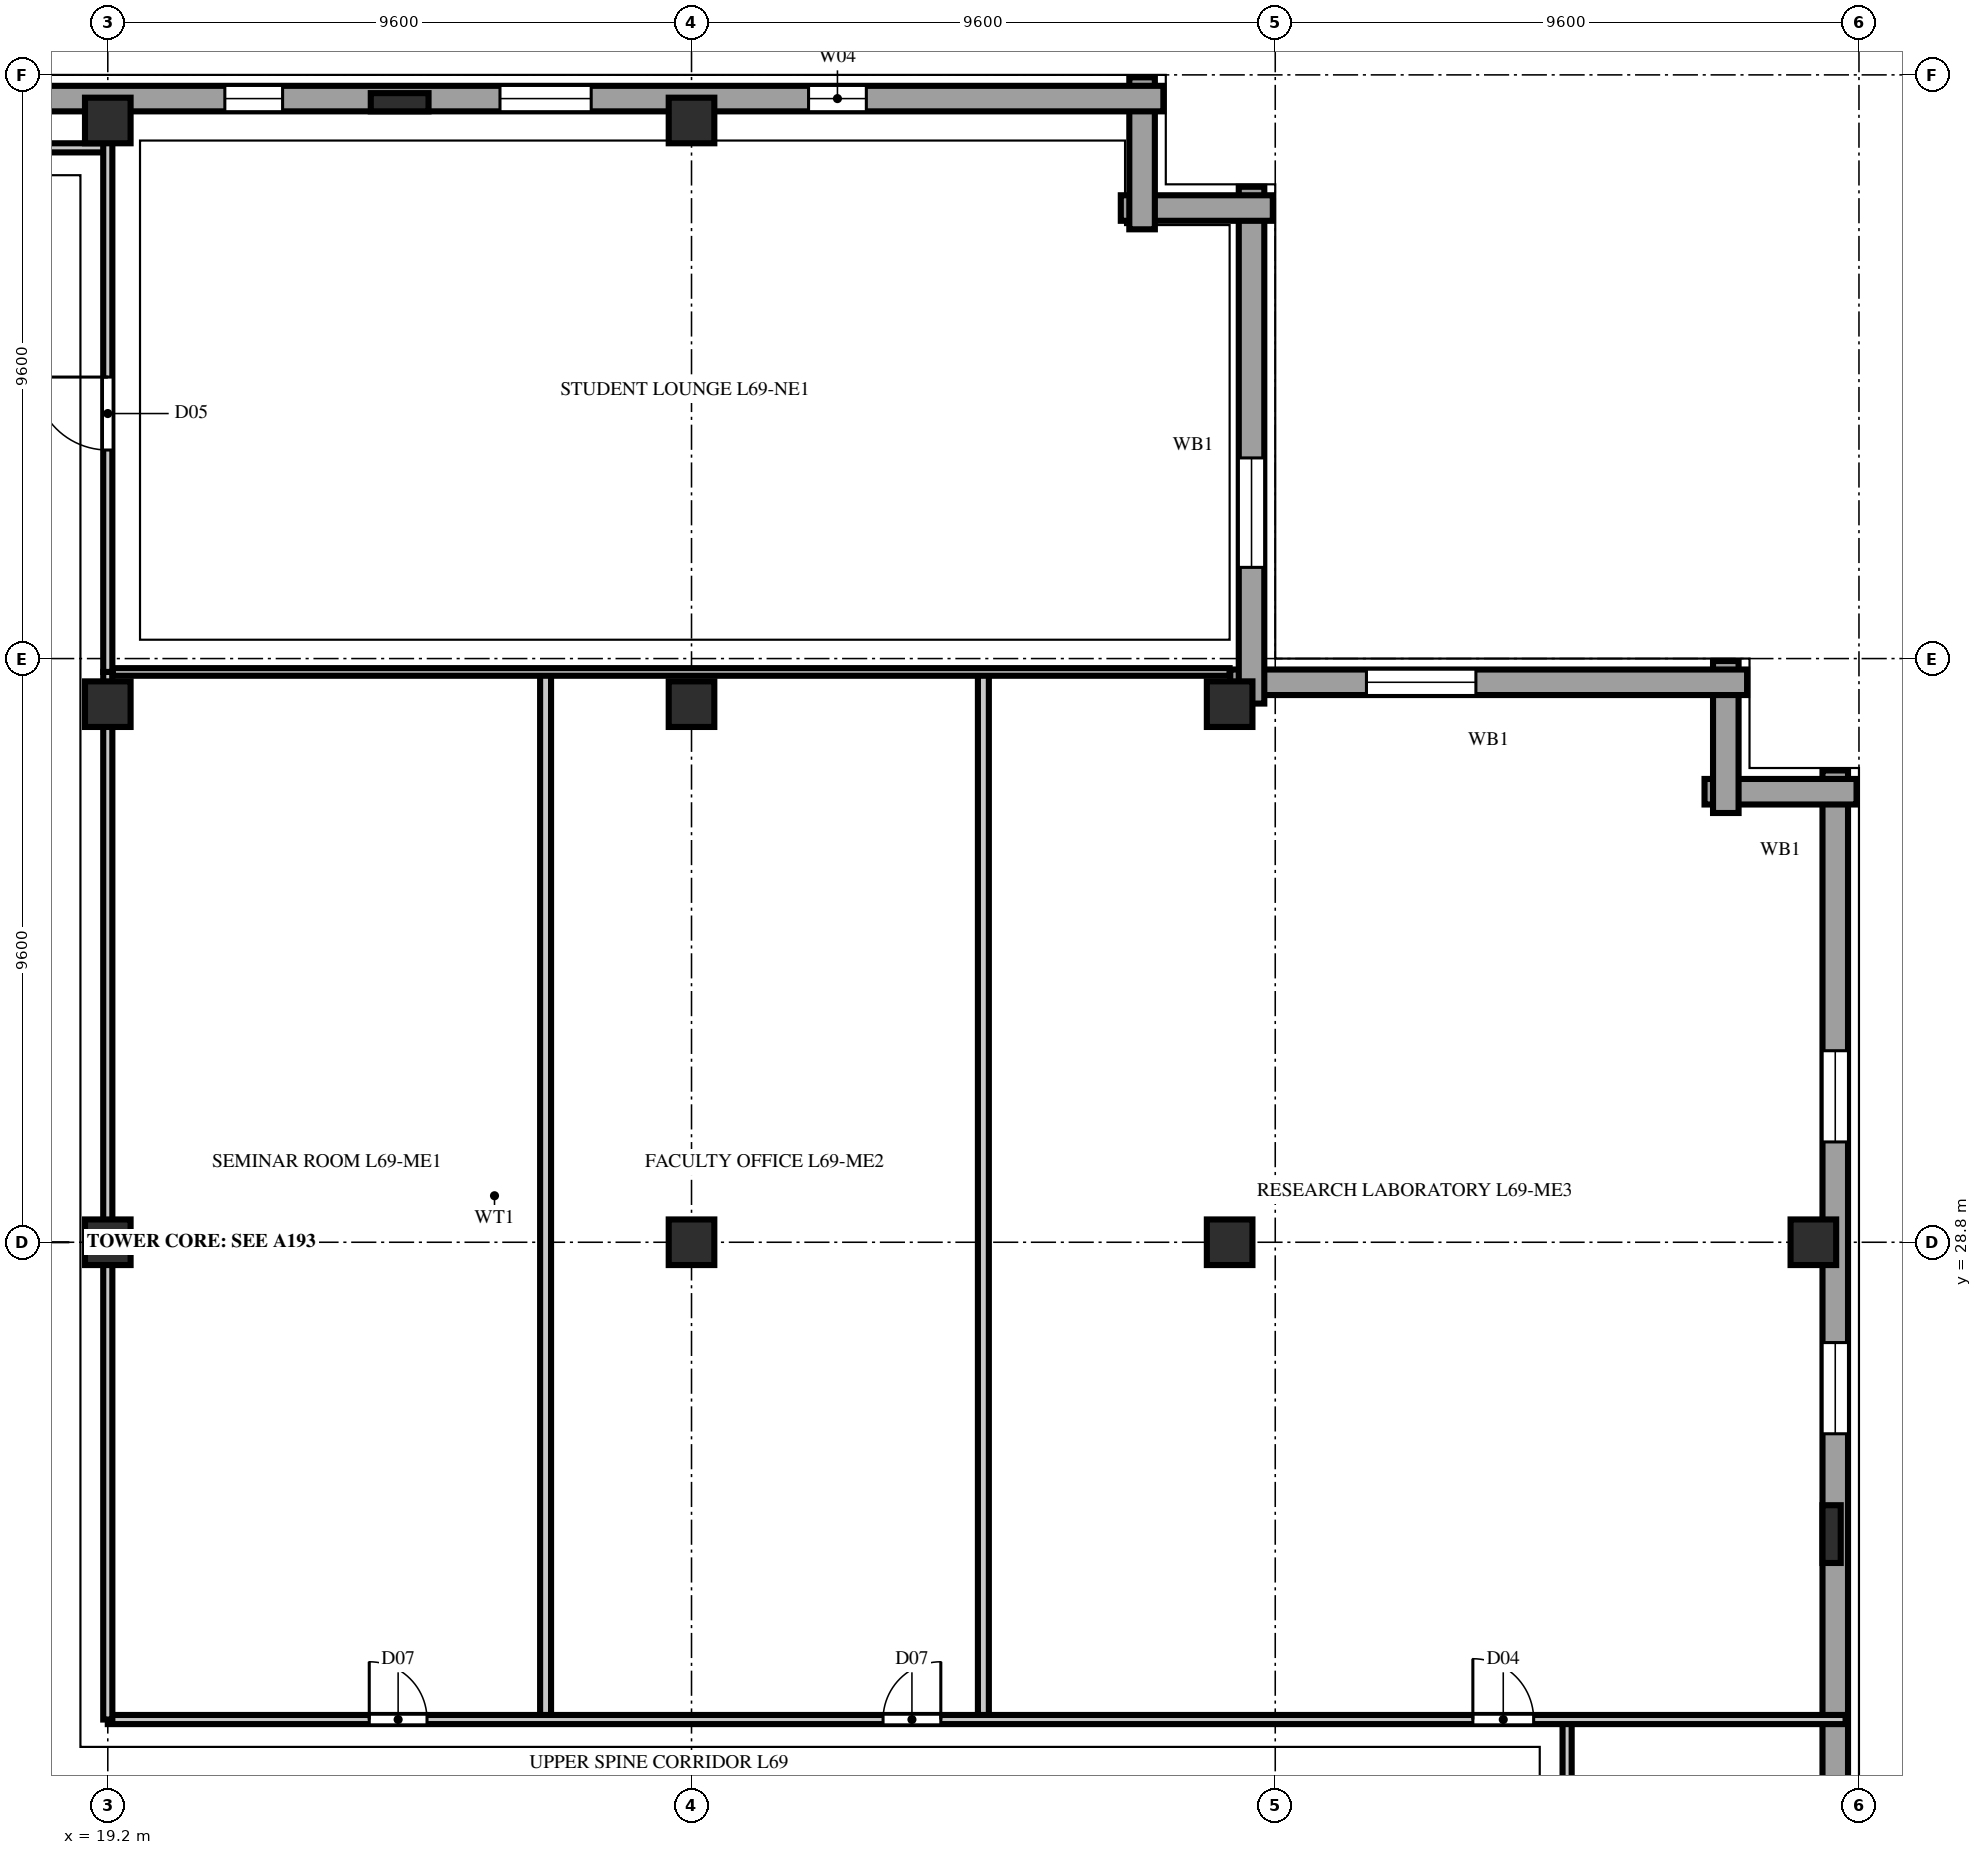
"""IFC4 building model, lengths in metres.
Left out: names, types, materials, properties, quantities, classifications, styles, units other than length and angle.
Written with IfcOpenShell. Run it as: python <this file> out.ifc"""

import sys

from ifc_helpers import new_model, si_unit, direction, frame, frame_2d, origin, origin_2d, place, context, subcontext, project, spatial, rectangle, extrude, element, fill, save


model = new_model("IFC4")
c1 = context("Model", 3, precision=1e-05, world=origin(), true_north=direction((0.0, 1.0)))
c2 = subcontext(c1, "Body", "Model", "MODEL_VIEW")
j1 = project(units=[si_unit("LENGTHUNIT", "METRE"), si_unit("PLANEANGLEUNIT", "RADIAN")], contexts=[c1])
p1 = place(None, origin())
s1 = spatial("IfcSite", under=j1, at=p1, CompositionType="ELEMENT")
p2 = place(p1, origin())
s2 = spatial("IfcBuilding", under=s1, at=p2, CompositionType="ELEMENT")
p3 = place(p2, frame((0.0, 0.0, 273.4)))
s3 = spatial("IfcBuildingStorey", under=s2, at=p3, CompositionType="ELEMENT", Elevation=273.4)
for number, where, z_axis, x_axis in (
    (1, (19.2, 28.8, 0.0), (0.0, 0.0, 1.0), (1.0, 0.0, 0.0)),
    (2, (19.2, 37.65, 0.0), (0.0, 0.0, 1.0), (1.0, 0.0, 0.0)),
    (3, (19.2, 47.25, 0.0), (0.0, 0.0, 1.0), (1.0, 0.0, 0.0)),
    (4, (28.8, 28.8, 0.0), (0.0, 0.0, 1.0), (1.0, 0.0, 0.0)),
    (5, (28.8, 37.65, 0.0), (0.0, 0.0, 1.0), (1.0, 0.0, 0.0)),
    (6, (28.8, 47.25, 0.0), (0.0, 0.0, 1.0), (1.0, 0.0, 0.0)),
    (7, (37.65, 28.8, 0.0), (0.0, 0.0, 1.0), (1.0, 0.0, 0.0)),
    (8, (37.65, 37.65, 0.0), (0.0, 0.0, 1.0), (1.0, 0.0, 0.0)),
    (9, (47.25, 28.8, 0.0), (0.0, 0.0, 1.0), (1.0, 0.0, 0.0)),
):
    element("IfcColumn", number, at=place(p3, frame(where, z_axis=z_axis, x_axis=x_axis)), inside=s3, PredefinedType="COLUMN", context=c2, shape_type="SweptSolid", body=[
        extrude(rectangle(XDim=0.75, YDim=0.75, at=origin_2d()), origin(), (0.0, 0.0, 1.0), 3.8),
    ])
for number, where, z_axis, x_axis in (
    (10, (47.55, 24.0, 0.0), (0.0, 0.0, 1.0), (0.0, 1.0, 0.0)),
    (11, (24.0, 47.55, 0.0), (0.0, 0.0, 1.0), (1.0, 0.0, 0.0)),
):
    element("IfcColumn", number, at=place(p3, frame(where, z_axis=z_axis, x_axis=x_axis)), inside=s3, PredefinedType="PILASTER", context=c2, shape_type="SweptSolid", body=[
        extrude(rectangle(XDim=0.95, YDim=0.3, at=origin_2d()), origin(), (0.0, 0.0, 1.0), 3.8),
    ])
p4 = place(p3, frame((47.61, 1.84, 0.0), z_axis=(0.0, 0.0, 1.0), x_axis=(0.0, 1.0, 0.0)))
e12 = element("IfcWall", 12, at=p4, inside=s3, PredefinedType="SOLIDWALL", context=c2, shape_type="SweptSolid", body=[
    extrude(rectangle(XDim=34.72, YDim=0.42, at=frame_2d((17.36, 0.0))), origin(), (0.0, 0.0, 1.0), 3.54),
])
p5 = place(p4, frame((4.61, 0.0, 0.85)))
e13 = element("IfcOpeningElement", 13, at=p5, cuts=e12, PredefinedType="OPENING", context=c2, shape_type="SweptSolid", body=[
    extrude(rectangle(XDim=1.5, YDim=1.85, at=frame_2d((0.75, 0.925))), frame((0.0, 0.222, 0.0), z_axis=(0.0, -1.0, 0.0), x_axis=(1.0, 0.0, 0.0)), (0.0, 0.0, 1.0), 0.444),
])
p6 = place(p4, frame((9.41, 0.0, 0.85)))
e14 = element("IfcOpeningElement", 14, at=p6, cuts=e12, PredefinedType="OPENING", context=c2, shape_type="SweptSolid", body=[
    extrude(rectangle(XDim=1.5, YDim=1.85, at=frame_2d((0.75, 0.925))), frame((0.0, 0.222, 0.0), z_axis=(0.0, -1.0, 0.0), x_axis=(1.0, 0.0, 0.0)), (0.0, 0.0, 1.0), 0.444),
])
p7 = place(p4, frame((14.21, 0.0, 0.85)))
e15 = element("IfcOpeningElement", 15, at=p7, cuts=e12, PredefinedType="OPENING", context=c2, shape_type="SweptSolid", body=[
    extrude(rectangle(XDim=1.5, YDim=1.85, at=frame_2d((0.75, 0.925))), frame((0.0, 0.222, 0.0), z_axis=(0.0, -1.0, 0.0), x_axis=(1.0, 0.0, 0.0)), (0.0, 0.0, 1.0), 0.444),
])
p8 = place(p4, frame((23.81, 0.0, 0.85)))
e16 = element("IfcOpeningElement", 16, at=p8, cuts=e12, PredefinedType="OPENING", context=c2, shape_type="SweptSolid", body=[
    extrude(rectangle(XDim=1.5, YDim=1.85, at=frame_2d((0.75, 0.925))), frame((0.0, 0.222, 0.0), z_axis=(0.0, -1.0, 0.0), x_axis=(1.0, 0.0, 0.0)), (0.0, 0.0, 1.0), 0.444),
])
p9 = place(p4, frame((28.61, 0.0, 0.85)))
e17 = element("IfcOpeningElement", 17, at=p9, cuts=e12, PredefinedType="OPENING", context=c2, shape_type="SweptSolid", body=[
    extrude(rectangle(XDim=1.5, YDim=1.85, at=frame_2d((0.75, 0.925))), frame((0.0, 0.222, 0.0), z_axis=(0.0, -1.0, 0.0), x_axis=(1.0, 0.0, 0.0)), (0.0, 0.0, 1.0), 0.444),
])
for number, where, z_axis, x_axis in (
    (18, (47.96, 36.21, 0.0), (0.0, 0.0, 1.0), (-1.0, 0.0, 0.0)),
    (19, (45.81, 35.86, 0.0), (0.0, 0.0, 1.0), (0.0, 1.0, 0.0)),
):
    element("IfcWall", number, at=place(p3, frame(where, z_axis=z_axis, x_axis=x_axis)), inside=s3, PredefinedType="SOLIDWALL", context=c2, shape_type="SweptSolid", body=[
        extrude(rectangle(XDim=2.5, YDim=0.42, at=frame_2d((1.25, 0.0))), origin(), (0.0, 0.0, 1.0), 3.54),
    ])
p10 = place(p3, frame((46.16, 38.01, 0.0), z_axis=(0.0, 0.0, 1.0), x_axis=(-1.0, 0.0, 0.0)))
e20 = element("IfcWall", 20, at=p10, inside=s3, PredefinedType="SOLIDWALL", context=c2, shape_type="SweptSolid", body=[
    extrude(rectangle(XDim=8.5, YDim=0.42, at=frame_2d((4.25, 0.0))), origin(), (0.0, 0.0, 1.0), 3.54),
])
p11 = place(p10, frame((4.46, 0.0, 0.85)))
e21 = element("IfcOpeningElement", 21, at=p11, cuts=e20, PredefinedType="OPENING", context=c2, shape_type="SweptSolid", body=[
    extrude(rectangle(XDim=1.8, YDim=1.85, at=frame_2d((0.9, 0.925))), frame((0.0, 0.222, 0.0), z_axis=(0.0, -1.0, 0.0), x_axis=(1.0, 0.0, 0.0)), (0.0, 0.0, 1.0), 0.444),
])
p12 = place(p3, frame((38.01, 37.66, 0.0), z_axis=(0.0, 0.0, 1.0), x_axis=(0.0, 1.0, 0.0)))
e22 = element("IfcWall", 22, at=p12, inside=s3, PredefinedType="SOLIDWALL", context=c2, shape_type="SweptSolid", body=[
    extrude(rectangle(XDim=8.5, YDim=0.42, at=frame_2d((4.25, 0.0))), origin(), (0.0, 0.0, 1.0), 3.54),
])
p13 = place(p12, frame((2.24, 0.0, 0.85)))
e23 = element("IfcOpeningElement", 23, at=p13, cuts=e22, PredefinedType="OPENING", context=c2, shape_type="SweptSolid", body=[
    extrude(rectangle(XDim=1.8, YDim=1.85, at=frame_2d((0.9, 0.925))), frame((0.0, 0.222, 0.0), z_axis=(0.0, -1.0, 0.0), x_axis=(1.0, 0.0, 0.0)), (0.0, 0.0, 1.0), 0.444),
])
for number, where, z_axis, x_axis in (
    (24, (38.36, 45.81, 0.0), (0.0, 0.0, 1.0), (-1.0, 0.0, 0.0)),
    (25, (36.21, 45.46, 0.0), (0.0, 0.0, 1.0), (0.0, 1.0, 0.0)),
):
    element("IfcWall", number, at=place(p3, frame(where, z_axis=z_axis, x_axis=x_axis)), inside=s3, PredefinedType="SOLIDWALL", context=c2, shape_type="SweptSolid", body=[
        extrude(rectangle(XDim=2.5, YDim=0.42, at=frame_2d((1.25, 0.0))), origin(), (0.0, 0.0, 1.0), 3.54),
    ])
p14 = place(p3, frame((36.56, 47.61, 0.0), z_axis=(0.0, 0.0, 1.0), x_axis=(-1.0, 0.0, 0.0)))
e26 = element("IfcWall", 26, at=p14, inside=s3, PredefinedType="SOLIDWALL", context=c2, shape_type="SweptSolid", body=[
    extrude(rectangle(XDim=34.085, YDim=0.42, at=frame_2d((17.042, 0.0))), origin(), (0.0, 0.0, 1.0), 3.54),
])
p15 = place(p14, frame((4.885, 0.0, 0.9)))
e27 = element("IfcOpeningElement", 27, at=p15, cuts=e26, PredefinedType="OPENING", context=c2, shape_type="SweptSolid", body=[
    extrude(rectangle(XDim=0.95, YDim=1.85, at=frame_2d((0.475, 0.925))), frame((0.0, 0.222, 0.0), z_axis=(0.0, -1.0, 0.0), x_axis=(1.0, 0.0, 0.0)), (0.0, 0.0, 1.0), 0.444),
])
p16 = place(p14, frame((9.41, 0.0, 0.9)))
e28 = element("IfcOpeningElement", 28, at=p16, cuts=e26, PredefinedType="OPENING", context=c2, shape_type="SweptSolid", body=[
    extrude(rectangle(XDim=1.5, YDim=1.85, at=frame_2d((0.75, 0.925))), frame((0.0, 0.222, 0.0), z_axis=(0.0, -1.0, 0.0), x_axis=(1.0, 0.0, 0.0)), (0.0, 0.0, 1.0), 0.444),
])
p17 = place(p14, frame((14.485, 0.0, 0.9)))
e29 = element("IfcOpeningElement", 29, at=p17, cuts=e26, PredefinedType="OPENING", context=c2, shape_type="SweptSolid", body=[
    extrude(rectangle(XDim=0.95, YDim=1.85, at=frame_2d((0.475, 0.925))), frame((0.0, 0.222, 0.0), z_axis=(0.0, -1.0, 0.0), x_axis=(1.0, 0.0, 0.0)), (0.0, 0.0, 1.0), 0.444),
])
p18 = place(p3, frame((17.05, 46.8, 0.0), z_axis=(0.0, 0.0, 1.0), x_axis=(1.0, 0.0, 0.0)))
e30 = element("IfcWall", 30, at=p18, inside=s3, PredefinedType="PARTITIONING", context=c2, shape_type="SweptSolid", body=[
    extrude(rectangle(XDim=2.15, YDim=0.15, at=frame_2d((1.075, 0.0))), origin(), (0.0, 0.0, 1.0), 3.54),
])
p19 = place(p3, frame((43.2, 18.1, 0.0), z_axis=(0.0, 0.0, 1.0), x_axis=(0.0, 1.0, 0.0)))
e31 = element("IfcWall", 31, at=p19, inside=s3, PredefinedType="PARTITIONING", context=c2, shape_type="SweptSolid", body=[
    extrude(rectangle(XDim=2.85, YDim=0.15, at=frame_2d((1.425, 0.0))), origin(), (0.0, 0.0, 1.0), 3.54),
])
for number, where, z_axis, x_axis in (
    (32, (26.4, 20.95, 0.0), (0.0, 0.0, 1.0), (0.0, 1.0, 0.0)),
    (33, (33.6, 20.95, 0.0), (0.0, 0.0, 1.0), (0.0, 1.0, 0.0)),
):
    element("IfcWall", number, at=place(p3, frame(where, z_axis=z_axis, x_axis=x_axis)), inside=s3, PredefinedType="PARTITIONING", context=c2, shape_type="SweptSolid", body=[
        extrude(rectangle(XDim=17.23, YDim=0.18, at=frame_2d((8.615, 0.0))), origin(), (0.0, 0.0, 1.0), 3.54),
    ])
p20 = place(p3, frame((19.2, 20.95, 0.0), z_axis=(0.0, 0.0, 1.0), x_axis=(1.0, 0.0, 0.0)))
e34 = element("IfcWall", 34, at=p20, inside=s3, PredefinedType="PARTITIONING", context=c2, shape_type="SweptSolid", body=[
    extrude(rectangle(XDim=28.58, YDim=0.15, at=frame_2d((14.29, 0.0))), origin(), (0.0, 0.0, 1.0), 3.54),
])
p21 = place(p20, frame((4.3, 0.0, 0.0)))
e35 = element("IfcOpeningElement", 35, at=p21, cuts=e34, PredefinedType="OPENING", context=c2, shape_type="SweptSolid", body=[
    extrude(rectangle(XDim=0.95, YDim=2.15, at=frame_2d((0.475, 1.075))), frame((0.0, 0.087, 0.0), z_axis=(0.0, -1.0, 0.0), x_axis=(1.0, 0.0, 0.0)), (0.0, 0.0, 1.0), 0.174),
])
p22 = place(p20, frame((12.75, 0.0, 0.0)))
e36 = element("IfcOpeningElement", 36, at=p22, cuts=e34, PredefinedType="OPENING", context=c2, shape_type="SweptSolid", body=[
    extrude(rectangle(XDim=0.95, YDim=2.15, at=frame_2d((0.475, 1.075))), frame((0.0, 0.087, 0.0), z_axis=(0.0, -1.0, 0.0), x_axis=(1.0, 0.0, 0.0)), (0.0, 0.0, 1.0), 0.174),
])
p23 = place(p20, frame((22.45, 0.0, 0.0)))
e37 = element("IfcOpeningElement", 37, at=p23, cuts=e34, PredefinedType="OPENING", context=c2, shape_type="SweptSolid", body=[
    extrude(rectangle(XDim=1.0, YDim=2.2, at=frame_2d((0.5, 1.1))), frame((0.0, 0.087, 0.0), z_axis=(0.0, -1.0, 0.0), x_axis=(1.0, 0.0, 0.0)), (0.0, 0.0, 1.0), 0.174),
])
p24 = place(p3, frame((19.2, 20.95, 0.0), z_axis=(0.0, 0.0, 1.0), x_axis=(0.0, 1.0, 0.0)))
e38 = element("IfcWall", 38, at=p24, inside=s3, PredefinedType="PARTITIONING", context=c2, shape_type="SweptSolid", body=[
    extrude(rectangle(XDim=17.23, YDim=0.15, at=frame_2d((8.615, 0.0))), origin(), (0.0, 0.0, 1.0), 3.123),
])
p25 = place(p3, frame((19.28, 38.18, 0.0), z_axis=(0.0, 0.0, 1.0), x_axis=(1.0, 0.0, 0.0)))
e39 = element("IfcWall", 39, at=p25, inside=s3, PredefinedType="PARTITIONING", context=c2, shape_type="SweptSolid", body=[
    extrude(rectangle(XDim=18.37, YDim=0.125, at=frame_2d((9.185, 0.0))), origin(), (0.0, 0.0, 1.0), 3.54),
])
p26 = place(p3, frame((19.2, 38.18, 0.0), z_axis=(0.0, 0.0, 1.0), x_axis=(0.0, 1.0, 0.0)))
e40 = element("IfcWall", 40, at=p26, inside=s3, PredefinedType="PARTITIONING", context=c2, shape_type="SweptSolid", body=[
    extrude(rectangle(XDim=9.27, YDim=0.15, at=frame_2d((4.635, 0.0))), origin(), (0.0, 0.0, 1.0), 3.123),
])
p27 = place(p26, frame((3.65, 0.0, 0.0)))
e41 = element("IfcOpeningElement", 41, at=p27, cuts=e40, PredefinedType="OPENING", context=c2, shape_type="SweptSolid", body=[
    extrude(rectangle(XDim=1.2, YDim=2.2, at=frame_2d((0.6, 1.1))), frame((0.0, 0.087, 0.0), z_axis=(0.0, -1.0, 0.0), x_axis=(1.0, 0.0, 0.0)), (0.0, 0.0, 1.0), 0.174),
])
p28 = place(p8, origin())
e42 = element("IfcWindow", 42, at=p28, inside=s3, PartitioningType="DOUBLE_PANEL_VERTICAL", PredefinedType="WINDOW", context=c2, shape_type="SweptSolid", body=[
    extrude(rectangle(XDim=1.5, YDim=1.85, at=frame_2d((0.75, 0.925))), frame((0.0, 0.11, 0.0), z_axis=(0.0, -1.0, 0.0), x_axis=(1.0, 0.0, 0.0)), (0.0, 0.0, 1.0), 0.06),
])
fill(e16, e42)
p29 = place(p9, origin())
e43 = element("IfcWindow", 43, at=p29, inside=s3, PartitioningType="DOUBLE_PANEL_VERTICAL", PredefinedType="WINDOW", context=c2, shape_type="SweptSolid", body=[
    extrude(rectangle(XDim=1.5, YDim=1.85, at=frame_2d((0.75, 0.925))), frame((0.0, 0.11, 0.0), z_axis=(0.0, -1.0, 0.0), x_axis=(1.0, 0.0, 0.0)), (0.0, 0.0, 1.0), 0.06),
])
fill(e17, e43)
p30 = place(p11, origin())
e44 = element("IfcWindow", 44, at=p30, inside=s3, PartitioningType="DOUBLE_PANEL_VERTICAL", PredefinedType="WINDOW", context=c2, shape_type="SweptSolid", body=[
    extrude(rectangle(XDim=1.8, YDim=1.85, at=frame_2d((0.9, 0.925))), frame((0.0, 0.11, 0.0), z_axis=(0.0, -1.0, 0.0), x_axis=(1.0, 0.0, 0.0)), (0.0, 0.0, 1.0), 0.06),
])
fill(e21, e44)
p31 = place(p13, origin())
e45 = element("IfcWindow", 45, at=p31, inside=s3, PartitioningType="DOUBLE_PANEL_VERTICAL", PredefinedType="WINDOW", context=c2, shape_type="SweptSolid", body=[
    extrude(rectangle(XDim=1.8, YDim=1.85, at=frame_2d((0.9, 0.925))), frame((0.0, 0.11, 0.0), z_axis=(0.0, -1.0, 0.0), x_axis=(1.0, 0.0, 0.0)), (0.0, 0.0, 1.0), 0.06),
])
fill(e23, e45)
p32 = place(p15, origin())
e46 = element("IfcWindow", 46, at=p32, inside=s3, PartitioningType="SINGLE_PANEL", PredefinedType="WINDOW", context=c2, shape_type="SweptSolid", body=[
    extrude(rectangle(XDim=0.95, YDim=1.85, at=frame_2d((0.475, 0.925))), frame((0.0, 0.11, 0.0), z_axis=(0.0, -1.0, 0.0), x_axis=(1.0, 0.0, 0.0)), (0.0, 0.0, 1.0), 0.06),
])
fill(e27, e46)
p33 = place(p16, origin())
e47 = element("IfcWindow", 47, at=p33, inside=s3, PartitioningType="DOUBLE_PANEL_VERTICAL", PredefinedType="WINDOW", context=c2, shape_type="SweptSolid", body=[
    extrude(rectangle(XDim=1.5, YDim=1.85, at=frame_2d((0.75, 0.925))), frame((0.0, 0.11, 0.0), z_axis=(0.0, -1.0, 0.0), x_axis=(1.0, 0.0, 0.0)), (0.0, 0.0, 1.0), 0.06),
])
fill(e28, e47)
p34 = place(p17, origin())
e48 = element("IfcWindow", 48, at=p34, inside=s3, PartitioningType="SINGLE_PANEL", PredefinedType="WINDOW", context=c2, shape_type="SweptSolid", body=[
    extrude(rectangle(XDim=0.95, YDim=1.85, at=frame_2d((0.475, 0.925))), frame((0.0, 0.11, 0.0), z_axis=(0.0, -1.0, 0.0), x_axis=(1.0, 0.0, 0.0)), (0.0, 0.0, 1.0), 0.06),
])
fill(e29, e48)
p35 = place(p21, origin())
e49 = element("IfcDoor", 49, at=p35, inside=s3, OperationType="SINGLE_SWING_LEFT", PredefinedType="DOOR", context=c2, shape_type="SweptSolid", body=[
    extrude(rectangle(XDim=0.95, YDim=2.15, at=frame_2d((0.475, 1.075))), frame((0.0, 0.025, 0.0), z_axis=(0.0, -1.0, 0.0), x_axis=(1.0, 0.0, 0.0)), (0.0, 0.0, 1.0), 0.05),
])
fill(e35, e49)
p36 = place(p22, origin())
e50 = element("IfcDoor", 50, at=p36, inside=s3, OperationType="SINGLE_SWING_RIGHT", PredefinedType="DOOR", context=c2, shape_type="SweptSolid", body=[
    extrude(rectangle(XDim=0.95, YDim=2.15, at=frame_2d((0.475, 1.075))), frame((0.0, 0.025, 0.0), z_axis=(0.0, -1.0, 0.0), x_axis=(1.0, 0.0, 0.0)), (0.0, 0.0, 1.0), 0.05),
])
fill(e36, e50)
p37 = place(p23, origin())
e51 = element("IfcDoor", 51, at=p37, inside=s3, OperationType="SINGLE_SWING_LEFT", PredefinedType="DOOR", context=c2, shape_type="SweptSolid", body=[
    extrude(rectangle(XDim=1.0, YDim=2.2, at=frame_2d((0.5, 1.1))), frame((0.0, 0.025, 0.0), z_axis=(0.0, -1.0, 0.0), x_axis=(1.0, 0.0, 0.0)), (0.0, 0.0, 1.0), 0.05),
])
fill(e37, e51)
p38 = place(p27, origin())
e52 = element("IfcDoor", 52, at=p38, inside=s3, OperationType="SINGLE_SWING_RIGHT", PredefinedType="DOOR", context=c2, shape_type="SweptSolid", body=[
    extrude(rectangle(XDim=1.2, YDim=2.2, at=frame_2d((0.6, 1.1))), frame((0.0, 0.025, 0.0), z_axis=(0.0, -1.0, 0.0), x_axis=(1.0, 0.0, 0.0)), (0.0, 0.0, 1.0), 0.05),
])
fill(e41, e52)
save(model, sys.argv[1])
